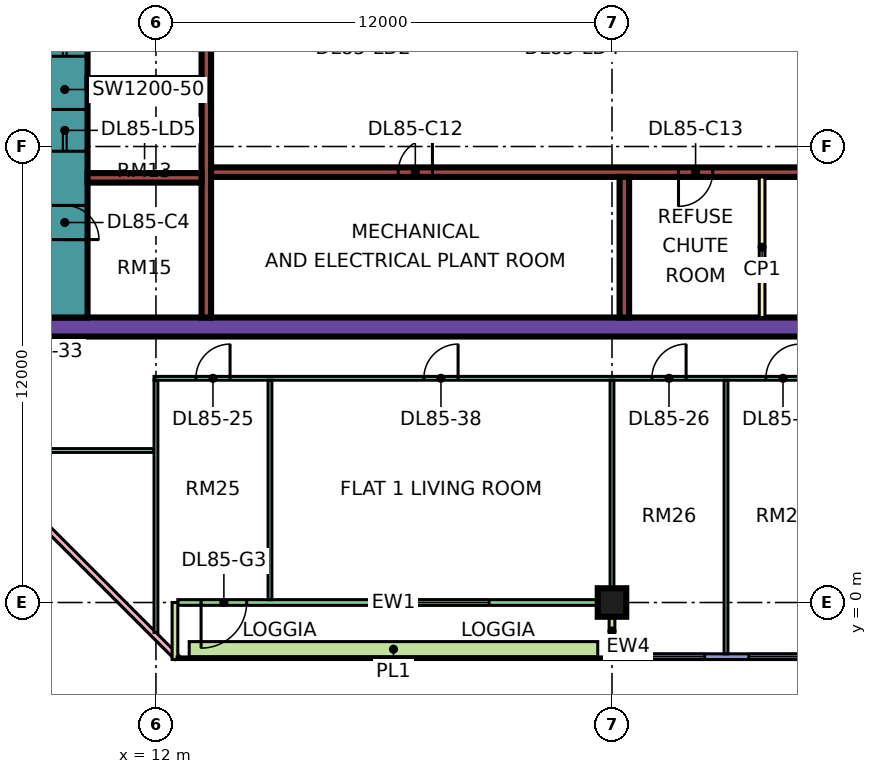
"""IFC4 building model, lengths in metres.
Left out: names, types, materials, properties, quantities, classifications, styles, units other than length and angle.
Written with IfcOpenShell. Run it as: python <this file> out.ifc"""

import sys

from ifc_helpers import new_model, si_unit, direction, frame, frame_2d, origin, origin_2d, place, context, subcontext, project, spatial, rectangle, extrude, element, fill, save


model = new_model("IFC4")
c1 = context("Model", 3, precision=1e-05, world=origin(), true_north=direction((0.0, 1.0)))
c2 = subcontext(c1, "Body", "Model", "MODEL_VIEW")
j1 = project(units=[si_unit("LENGTHUNIT", "METRE"), si_unit("PLANEANGLEUNIT", "RADIAN")], contexts=[c1])
p1 = place(None, origin())
s1 = spatial("IfcSite", under=j1, at=p1, CompositionType="ELEMENT")
p2 = place(p1, origin())
s2 = spatial("IfcBuilding", under=s1, at=p2, CompositionType="ELEMENT")
p3 = place(p2, frame((0.0, 0.0, 365.15)))
s3 = spatial("IfcBuildingStorey", under=s2, at=p3, CompositionType="ELEMENT", Elevation=365.15)
p4 = place(p3, frame((24.0, 0.0, 0.0), z_axis=(0.0, 0.0, 1.0), x_axis=(1.0, 0.0, 0.0)))
e1 = element("IfcColumn", 1, at=p4, inside=s3, PredefinedType="COLUMN", context=c2, shape_type="SweptSolid", body=[
    extrude(rectangle(XDim=0.75, YDim=0.75, at=origin_2d()), origin(), (0.0, 0.0, 1.0), 3.75),
])
p5 = place(p3, frame((9.0, 7.25, 0.0), z_axis=(0.0, 0.0, 1.0), x_axis=(1.0, 0.0, 0.0)))
e2 = element("IfcWall", 2, at=p5, inside=s3, PredefinedType="SHEAR", context=c2, shape_type="SweptSolid", body=[
    extrude(rectangle(XDim=25.0, YDim=0.5, at=frame_2d((12.5, 0.0))), origin(), (0.0, 0.0, 1.0), 3.75),
])
p6 = place(p3, frame((9.6, 7.5, 0.0), z_axis=(0.0, 0.0, 1.0), x_axis=(0.0, 1.0, 0.0)))
e3 = element("IfcWall", 3, at=p6, inside=s3, PredefinedType="SHEAR", context=c2, shape_type="SweptSolid", body=[
    extrude(rectangle(XDim=12.0, YDim=1.2, at=frame_2d((6.0, 0.0))), origin(), (0.0, 0.0, 1.0), 3.75),
])
p7 = place(p6, frame((4.375, 0.0, 0.0)))
e4 = element("IfcOpeningElement", 4, at=p7, cuts=e3, PredefinedType="OPENING", context=c2, shape_type="SweptSolid", body=[
    extrude(rectangle(XDim=1.1, YDim=2.2, at=frame_2d((0.55, 1.1))), frame((0.0, 0.61, 0.0), z_axis=(0.0, -1.0, 0.0), x_axis=(1.0, 0.0, 0.0)), (0.0, 0.0, 1.0), 1.22),
])
p8 = place(p6, frame((6.875, 0.0, 0.0)))
e5 = element("IfcOpeningElement", 5, at=p8, cuts=e3, PredefinedType="OPENING", context=c2, shape_type="SweptSolid", body=[
    extrude(rectangle(XDim=1.1, YDim=2.2, at=frame_2d((0.55, 1.1))), frame((0.0, 0.61, 0.0), z_axis=(0.0, -1.0, 0.0), x_axis=(1.0, 0.0, 0.0)), (0.0, 0.0, 1.0), 1.22),
])
p9 = place(p6, frame((9.85, 0.0, 0.0)))
e6 = element("IfcOpeningElement", 6, at=p9, cuts=e3, PredefinedType="OPENING", context=c2, shape_type="SweptSolid", body=[
    extrude(rectangle(XDim=1.1, YDim=2.2, at=frame_2d((0.55, 1.1))), frame((0.0, 0.61, 0.0), z_axis=(0.0, -1.0, 0.0), x_axis=(1.0, 0.0, 0.0)), (0.0, 0.0, 1.0), 1.22),
])
p10 = place(p6, frame((2.05, 0.0, 0.0)))
e7 = element("IfcOpeningElement", 7, at=p10, cuts=e3, PredefinedType="OPENING", context=c2, shape_type="SweptSolid", body=[
    extrude(rectangle(XDim=0.9, YDim=2.1, at=frame_2d((0.45, 1.05))), frame((0.0, 0.61, 0.0), z_axis=(0.0, -1.0, 0.0), x_axis=(1.0, 0.0, 0.0)), (0.0, 0.0, 1.0), 1.22),
])
p11 = place(p3, frame((13.325, 7.5, 0.0), z_axis=(0.0, 0.0, 1.0), x_axis=(0.0, 1.0, 0.0)))
e8 = element("IfcWall", 8, at=p11, inside=s3, PredefinedType="SHEAR", context=c2, shape_type="SweptSolid", body=[
    extrude(rectangle(XDim=12.0, YDim=0.25, at=frame_2d((6.0, 0.0))), origin(), (0.0, 0.0, 1.0), 3.75),
])
p12 = place(p3, frame((13.45, 11.325, 0.0), z_axis=(0.0, 0.0, 1.0), x_axis=(1.0, 0.0, 0.0)))
e9 = element("IfcWall", 9, at=p12, inside=s3, PredefinedType="SHEAR", context=c2, shape_type="SweptSolid", body=[
    extrude(rectangle(XDim=20.05, YDim=0.25, at=frame_2d((10.025, 0.0))), origin(), (0.0, 0.0, 1.0), 3.75),
])
p13 = place(p12, frame((4.925, 0.0, 0.0)))
e10 = element("IfcOpeningElement", 10, at=p13, cuts=e9, PredefinedType="OPENING", context=c2, shape_type="SweptSolid", body=[
    extrude(rectangle(XDim=0.9, YDim=2.1, at=frame_2d((0.45, 1.05))), frame((0.0, 0.135, 0.0), z_axis=(0.0, -1.0, 0.0), x_axis=(1.0, 0.0, 0.0)), (0.0, 0.0, 1.0), 0.27),
])
p14 = place(p12, frame((12.3, 0.0, 0.0)))
e11 = element("IfcOpeningElement", 11, at=p14, cuts=e9, PredefinedType="OPENING", context=c2, shape_type="SweptSolid", body=[
    extrude(rectangle(XDim=0.9, YDim=2.1, at=frame_2d((0.45, 1.05))), frame((0.0, 0.135, 0.0), z_axis=(0.0, -1.0, 0.0), x_axis=(1.0, 0.0, 0.0)), (0.0, 0.0, 1.0), 0.27),
])
p15 = place(p12, frame((16.825, 0.0, 0.0)))
e12 = element("IfcOpeningElement", 12, at=p15, cuts=e9, PredefinedType="OPENING", context=c2, shape_type="SweptSolid", body=[
    extrude(rectangle(XDim=0.9, YDim=2.1, at=frame_2d((0.45, 1.05))), frame((0.0, 0.135, 0.0), z_axis=(0.0, -1.0, 0.0), x_axis=(1.0, 0.0, 0.0)), (0.0, 0.0, 1.0), 0.27),
])
for number, where, z_axis, x_axis in (
    (13, (10.2, 11.175, 0.0), (0.0, 0.0, 1.0), (1.0, 0.0, 0.0)),
    (14, (10.2, 13.675, 0.0), (0.0, 0.0, 1.0), (1.0, 0.0, 0.0)),
):
    element("IfcWall", number, at=place(p3, frame(where, z_axis=z_axis, x_axis=x_axis)), inside=s3, PredefinedType="SHEAR", context=c2, shape_type="SweptSolid", body=[
        extrude(rectangle(XDim=3.0, YDim=0.25, at=frame_2d((1.5, 0.0))), origin(), (0.0, 0.0, 1.0), 3.75),
    ])
p16 = place(p3, frame((24.325, 7.5, 0.0), z_axis=(0.0, 0.0, 1.0), x_axis=(0.0, 1.0, 0.0)))
e15 = element("IfcWall", 15, at=p16, inside=s3, PredefinedType="SHEAR", context=c2, shape_type="SweptSolid", body=[
    extrude(rectangle(XDim=3.7, YDim=0.25, at=frame_2d((1.85, 0.0))), origin(), (0.0, 0.0, 1.0), 3.75),
])
p17 = place(p3, frame((-1.447, 12.553, 0.0), z_axis=(0.0, 0.0, 1.0), x_axis=(0.707106781187, -0.707106781187, 0.0)))
e16 = element("IfcWall", 16, at=p17, inside=s3, PredefinedType="SOLIDWALL", context=c2, shape_type="SweptSolid", body=[
    extrude(rectangle(XDim=19.799, YDim=0.15, at=frame_2d((9.899, 0.0))), origin(), (0.0, 0.0, 1.0), 3.35),
])
p18 = place(p17, frame((2.212, 0.0, 0.45)))
e17 = element("IfcOpeningElement", 17, at=p18, cuts=e16, PredefinedType="OPENING", context=c2, shape_type="SweptSolid", body=[
    extrude(rectangle(XDim=3.0, YDim=2.4, at=frame_2d((1.5, 1.2))), frame((0.0, 0.085, 0.0), z_axis=(0.0, -1.0, 0.0), x_axis=(1.0, 0.0, 0.0)), (0.0, 0.0, 1.0), 0.17),
])
p19 = place(p17, frame((10.216, 0.0, 0.45)))
e18 = element("IfcOpeningElement", 18, at=p19, cuts=e16, PredefinedType="OPENING", context=c2, shape_type="SweptSolid", body=[
    extrude(rectangle(XDim=3.0, YDim=2.4, at=frame_2d((1.5, 1.2))), frame((0.0, 0.085, 0.0), z_axis=(0.0, -1.0, 0.0), x_axis=(1.0, 0.0, 0.0)), (0.0, 0.0, 1.0), 0.17),
])
p20 = place(p3, frame((12.575, 0.0, 0.0), z_axis=(0.0, 0.0, 1.0), x_axis=(1.0, 0.0, 0.0)))
e19 = element("IfcWall", 19, at=p20, inside=s3, PredefinedType="SOLIDWALL", context=c2, shape_type="SweptSolid", body=[
    extrude(rectangle(XDim=11.35, YDim=0.15, at=frame_2d((5.675, 0.0))), origin(), (0.0, 0.0, 1.0), 3.35),
])
p21 = place(p20, frame((0.613, 0.0, 0.0)))
e20 = element("IfcOpeningElement", 20, at=p21, cuts=e19, PredefinedType="OPENING", context=c2, shape_type="SweptSolid", body=[
    extrude(rectangle(XDim=1.2, YDim=2.4, at=frame_2d((0.6, 1.2))), frame((0.0, 0.085, 0.0), z_axis=(0.0, -1.0, 0.0), x_axis=(1.0, 0.0, 0.0)), (0.0, 0.0, 1.0), 0.17),
])
p22 = place(p20, frame((5.188, 0.0, 0.45)))
e21 = element("IfcOpeningElement", 21, at=p22, cuts=e19, PredefinedType="OPENING", context=c2, shape_type="SweptSolid", body=[
    extrude(rectangle(XDim=3.0, YDim=2.4, at=frame_2d((1.5, 1.2))), frame((0.0, 0.085, 0.0), z_axis=(0.0, -1.0, 0.0), x_axis=(1.0, 0.0, 0.0)), (0.0, 0.0, 1.0), 0.17),
])
for number, where, z_axis, x_axis in (
    (22, (12.5, -1.5, 0.0), (0.0, 0.0, 1.0), (0.0, 1.0, 0.0)),
    (23, (24.0, -1.5, 0.0), (0.0, 0.0, 1.0), (0.0, 1.0, 0.0)),
):
    element("IfcWall", number, at=place(p3, frame(where, z_axis=z_axis, x_axis=x_axis)), inside=s3, PredefinedType="SOLIDWALL", context=c2, shape_type="SweptSolid", body=[
        extrude(rectangle(XDim=1.5, YDim=0.15, at=frame_2d((0.75, 0.0))), origin(), (0.0, 0.0, 1.0), 3.35),
    ])
p23 = place(p3, frame((24.075, -1.425, 0.0), z_axis=(0.0, 0.0, 1.0), x_axis=(1.0, 0.0, 0.0)))
e24 = element("IfcWall", 24, at=p23, inside=s3, PredefinedType="SOLIDWALL", context=c2, shape_type="SweptSolid", body=[
    extrude(rectangle(XDim=11.85, YDim=0.15, at=frame_2d((5.925, 0.0))), origin(), (0.0, 0.0, 1.0), 3.35),
])
p24 = place(p23, frame((0.562, 0.0, 0.45)))
e25 = element("IfcOpeningElement", 25, at=p24, cuts=e24, PredefinedType="OPENING", context=c2, shape_type="SweptSolid", body=[
    extrude(rectangle(XDim=1.8, YDim=2.4, at=frame_2d((0.9, 1.2))), frame((0.0, 0.085, 0.0), z_axis=(0.0, -1.0, 0.0), x_axis=(1.0, 0.0, 0.0)), (0.0, 0.0, 1.0), 0.17),
])
p25 = place(p23, frame((3.525, 0.0, 0.45)))
e26 = element("IfcOpeningElement", 26, at=p25, cuts=e24, PredefinedType="OPENING", context=c2, shape_type="SweptSolid", body=[
    extrude(rectangle(XDim=1.8, YDim=2.4, at=frame_2d((0.9, 1.2))), frame((0.0, 0.085, 0.0), z_axis=(0.0, -1.0, 0.0), x_axis=(1.0, 0.0, 0.0)), (0.0, 0.0, 1.0), 0.17),
])
p26 = place(p23, frame((6.525, 0.0, 0.45)))
e27 = element("IfcOpeningElement", 27, at=p26, cuts=e24, PredefinedType="OPENING", context=c2, shape_type="SweptSolid", body=[
    extrude(rectangle(XDim=1.8, YDim=2.4, at=frame_2d((0.9, 1.2))), frame((0.0, 0.085, 0.0), z_axis=(0.0, -1.0, 0.0), x_axis=(1.0, 0.0, 0.0)), (0.0, 0.0, 1.0), 0.17),
])
p27 = place(p23, frame((9.488, 0.0, 0.45)))
e28 = element("IfcOpeningElement", 28, at=p27, cuts=e24, PredefinedType="OPENING", context=c2, shape_type="SweptSolid", body=[
    extrude(rectangle(XDim=1.8, YDim=2.4, at=frame_2d((0.9, 1.2))), frame((0.0, 0.085, 0.0), z_axis=(0.0, -1.0, 0.0), x_axis=(1.0, 0.0, 0.0)), (0.0, 0.0, 1.0), 0.17),
])
p28 = place(p3, frame((12.875, -1.229, 0.0), z_axis=(0.0, 0.0, 1.0), x_axis=(1.0, 0.0, 0.0)))
e29 = element("IfcWall", 29, at=p28, inside=s3, PredefinedType="SOLIDWALL", context=c2, shape_type="SweptSolid", body=[
    extrude(rectangle(XDim=10.75, YDim=0.4, at=frame_2d((5.375, 0.0))), origin(), (0.0, 0.0, 1.0), 0.7),
])
p29 = place(p3, frame((27.95, 7.5, 0.0), z_axis=(0.0, 0.0, 1.0), x_axis=(0.0, 1.0, 0.0)))
e30 = element("IfcWall", 30, at=p29, inside=s3, PredefinedType="PARTITIONING", context=c2, shape_type="SweptSolid", body=[
    extrude(rectangle(XDim=3.7, YDim=0.15, at=frame_2d((1.85, 0.0))), origin(), (0.0, 0.0, 1.0), 3.35),
])
p30 = place(p3, frame((9.05, 4.0, 0.0), z_axis=(0.0, 0.0, 1.0), x_axis=(1.0, 0.0, 0.0)))
e31 = element("IfcWall", 31, at=p30, inside=s3, PredefinedType="PARTITIONING", context=c2, shape_type="SweptSolid", body=[
    extrude(rectangle(XDim=2.9, YDim=0.1, at=frame_2d((1.45, 0.0))), origin(), (0.0, 0.0, 1.0), 3.35),
])
p31 = place(p3, frame((11.95, 5.9, 0.0), z_axis=(0.0, 0.0, 1.0), x_axis=(1.0, 0.0, 0.0)))
e32 = element("IfcWall", 32, at=p31, inside=s3, PredefinedType="PARTITIONING", context=c2, shape_type="SweptSolid", body=[
    extrude(rectangle(XDim=21.1, YDim=0.1, at=frame_2d((10.55, 0.0))), origin(), (0.0, 0.0, 1.0), 3.35),
])
p32 = place(p31, frame((1.1, 0.0, 0.0)))
e33 = element("IfcOpeningElement", 33, at=p32, cuts=e32, PredefinedType="OPENING", context=c2, shape_type="SweptSolid", body=[
    extrude(rectangle(XDim=0.9, YDim=2.1, at=frame_2d((0.45, 1.05))), frame((0.0, 0.06, 0.0), z_axis=(0.0, -1.0, 0.0), x_axis=(1.0, 0.0, 0.0)), (0.0, 0.0, 1.0), 0.12),
])
p33 = place(p31, frame((13.1, 0.0, 0.0)))
e34 = element("IfcOpeningElement", 34, at=p33, cuts=e32, PredefinedType="OPENING", context=c2, shape_type="SweptSolid", body=[
    extrude(rectangle(XDim=0.9, YDim=2.1, at=frame_2d((0.45, 1.05))), frame((0.0, 0.06, 0.0), z_axis=(0.0, -1.0, 0.0), x_axis=(1.0, 0.0, 0.0)), (0.0, 0.0, 1.0), 0.12),
])
p34 = place(p31, frame((16.1, 0.0, 0.0)))
e35 = element("IfcOpeningElement", 35, at=p34, cuts=e32, PredefinedType="OPENING", context=c2, shape_type="SweptSolid", body=[
    extrude(rectangle(XDim=0.9, YDim=2.1, at=frame_2d((0.45, 1.05))), frame((0.0, 0.06, 0.0), z_axis=(0.0, -1.0, 0.0), x_axis=(1.0, 0.0, 0.0)), (0.0, 0.0, 1.0), 0.12),
])
p35 = place(p31, frame((7.1, 0.0, 0.0)))
e36 = element("IfcOpeningElement", 36, at=p35, cuts=e32, PredefinedType="OPENING", context=c2, shape_type="SweptSolid", body=[
    extrude(rectangle(XDim=0.9, YDim=2.1, at=frame_2d((0.45, 1.05))), frame((0.0, 0.06, 0.0), z_axis=(0.0, -1.0, 0.0), x_axis=(1.0, 0.0, 0.0)), (0.0, 0.0, 1.0), 0.12),
])
p36 = place(p3, frame((12.0, -0.788, 0.0), z_axis=(0.0, 0.0, 1.0), x_axis=(0.0, 1.0, 0.0)))
e37 = element("IfcWall", 37, at=p36, inside=s3, PredefinedType="PARTITIONING", context=c2, shape_type="SweptSolid", body=[
    extrude(rectangle(XDim=6.638, YDim=0.1, at=frame_2d((3.319, 0.0))), origin(), (0.0, 0.0, 1.0), 3.35),
])
p37 = place(p3, frame((15.0, 0.074, 0.0), z_axis=(0.0, 0.0, 1.0), x_axis=(0.0, 1.0, 0.0)))
e38 = element("IfcWall", 38, at=p37, inside=s3, PredefinedType="PARTITIONING", context=c2, shape_type="SweptSolid", body=[
    extrude(rectangle(XDim=5.776, YDim=0.1, at=frame_2d((2.888, 0.0))), origin(), (0.0, 0.0, 1.0), 3.35),
])
p38 = place(p3, frame((24.0, 0.0, 0.0), z_axis=(0.0, 0.0, 1.0), x_axis=(0.0, 1.0, 0.0)))
e39 = element("IfcWall", 39, at=p38, inside=s3, PredefinedType="PARTITIONING", context=c2, shape_type="SweptSolid", body=[
    extrude(rectangle(XDim=5.85, YDim=0.1, at=frame_2d((2.925, 0.0))), origin(), (0.0, 0.0, 1.0), 3.35),
])
p39 = place(p3, frame((27.0, -1.351, 0.0), z_axis=(0.0, 0.0, 1.0), x_axis=(0.0, 1.0, 0.0)))
e40 = element("IfcWall", 40, at=p39, inside=s3, PredefinedType="PARTITIONING", context=c2, shape_type="SweptSolid", body=[
    extrude(rectangle(XDim=7.201, YDim=0.1, at=frame_2d((3.601, 0.0))), origin(), (0.0, 0.0, 1.0), 3.35),
])
p40 = place(p21, frame((1.2, 0.0, 0.0), z_axis=(0.0, 0.0, 1.0), x_axis=(-1.0, 0.0, 0.0)))
e41 = element("IfcDoor", 41, at=p40, inside=s3, OperationType="DOUBLE_DOOR_SINGLE_SWING", PredefinedType="DOOR", context=c2, shape_type="SweptSolid", body=[
    extrude(rectangle(XDim=1.2, YDim=2.4, at=frame_2d((0.6, 1.2))), frame((0.0, 0.025, 0.0), z_axis=(0.0, -1.0, 0.0), x_axis=(1.0, 0.0, 0.0)), (0.0, 0.0, 1.0), 0.05),
])
fill(e20, e41)
p41 = place(p22, origin())
e42 = element("IfcWindow", 42, at=p41, inside=s3, PartitioningType="SINGLE_PANEL", PredefinedType="WINDOW", context=c2, shape_type="SweptSolid", body=[
    extrude(rectangle(XDim=3.0, YDim=2.4, at=frame_2d((1.5, 1.2))), frame((0.0, 0.03, 0.0), z_axis=(0.0, -1.0, 0.0), x_axis=(1.0, 0.0, 0.0)), (0.0, 0.0, 1.0), 0.06),
])
fill(e21, e42)
p42 = place(p24, origin())
e43 = element("IfcWindow", 43, at=p42, inside=s3, PartitioningType="SINGLE_PANEL", PredefinedType="WINDOW", context=c2, shape_type="SweptSolid", body=[
    extrude(rectangle(XDim=1.8, YDim=2.4, at=frame_2d((0.9, 1.2))), frame((0.0, 0.03, 0.0), z_axis=(0.0, -1.0, 0.0), x_axis=(1.0, 0.0, 0.0)), (0.0, 0.0, 1.0), 0.06),
])
fill(e25, e43)
p43 = place(p25, origin())
e44 = element("IfcWindow", 44, at=p43, inside=s3, PartitioningType="SINGLE_PANEL", PredefinedType="WINDOW", context=c2, shape_type="SweptSolid", body=[
    extrude(rectangle(XDim=1.8, YDim=2.4, at=frame_2d((0.9, 1.2))), frame((0.0, 0.03, 0.0), z_axis=(0.0, -1.0, 0.0), x_axis=(1.0, 0.0, 0.0)), (0.0, 0.0, 1.0), 0.06),
])
fill(e26, e44)
p44 = place(p7, origin())
e45 = element("IfcDoor", 45, at=p44, inside=s3, OperationType="DOUBLE_DOOR_SLIDING", PredefinedType="DOOR", context=c2, shape_type="SweptSolid", body=[
    extrude(rectangle(XDim=1.1, YDim=2.2, at=frame_2d((0.55, 1.1))), frame((0.0, 0.025, 0.0), z_axis=(0.0, -1.0, 0.0), x_axis=(1.0, 0.0, 0.0)), (0.0, 0.0, 1.0), 0.05),
])
fill(e4, e45)
p45 = place(p8, origin())
e46 = element("IfcDoor", 46, at=p45, inside=s3, OperationType="DOUBLE_DOOR_SLIDING", PredefinedType="DOOR", context=c2, shape_type="SweptSolid", body=[
    extrude(rectangle(XDim=1.1, YDim=2.2, at=frame_2d((0.55, 1.1))), frame((0.0, 0.025, 0.0), z_axis=(0.0, -1.0, 0.0), x_axis=(1.0, 0.0, 0.0)), (0.0, 0.0, 1.0), 0.05),
])
fill(e5, e46)
p46 = place(p10, frame((0.9, 0.0, 0.0), z_axis=(0.0, 0.0, 1.0), x_axis=(-1.0, 0.0, 0.0)))
e47 = element("IfcDoor", 47, at=p46, inside=s3, OperationType="SINGLE_SWING_LEFT", PredefinedType="DOOR", context=c2, shape_type="SweptSolid", body=[
    extrude(rectangle(XDim=0.9, YDim=2.1, at=frame_2d((0.45, 1.05))), frame((0.0, 0.025, 0.0), z_axis=(0.0, -1.0, 0.0), x_axis=(1.0, 0.0, 0.0)), (0.0, 0.0, 1.0), 0.05),
])
fill(e7, e47)
p47 = place(p13, frame((0.9, 0.0, 0.0), z_axis=(0.0, 0.0, 1.0), x_axis=(-1.0, 0.0, 0.0)))
e48 = element("IfcDoor", 48, at=p47, inside=s3, OperationType="SINGLE_SWING_RIGHT", PredefinedType="DOOR", context=c2, shape_type="SweptSolid", body=[
    extrude(rectangle(XDim=0.9, YDim=2.1, at=frame_2d((0.45, 1.05))), frame((0.0, 0.025, 0.0), z_axis=(0.0, -1.0, 0.0), x_axis=(1.0, 0.0, 0.0)), (0.0, 0.0, 1.0), 0.05),
])
fill(e10, e48)
p48 = place(p14, frame((0.9, 0.0, 0.0), z_axis=(0.0, 0.0, 1.0), x_axis=(-1.0, 0.0, 0.0)))
e49 = element("IfcDoor", 49, at=p48, inside=s3, OperationType="SINGLE_SWING_LEFT", PredefinedType="DOOR", context=c2, shape_type="SweptSolid", body=[
    extrude(rectangle(XDim=0.9, YDim=2.1, at=frame_2d((0.45, 1.05))), frame((0.0, 0.025, 0.0), z_axis=(0.0, -1.0, 0.0), x_axis=(1.0, 0.0, 0.0)), (0.0, 0.0, 1.0), 0.05),
])
fill(e11, e49)
p49 = place(p32, frame((0.9, 0.0, 0.0), z_axis=(0.0, 0.0, 1.0), x_axis=(-1.0, 0.0, 0.0)))
e50 = element("IfcDoor", 50, at=p49, inside=s3, OperationType="SINGLE_SWING_RIGHT", PredefinedType="DOOR", context=c2, shape_type="SweptSolid", body=[
    extrude(rectangle(XDim=0.9, YDim=2.1, at=frame_2d((0.45, 1.05))), frame((0.0, 0.025, 0.0), z_axis=(0.0, -1.0, 0.0), x_axis=(1.0, 0.0, 0.0)), (0.0, 0.0, 1.0), 0.05),
])
fill(e33, e50)
p50 = place(p33, frame((0.9, 0.0, 0.0), z_axis=(0.0, 0.0, 1.0), x_axis=(-1.0, 0.0, 0.0)))
e51 = element("IfcDoor", 51, at=p50, inside=s3, OperationType="SINGLE_SWING_RIGHT", PredefinedType="DOOR", context=c2, shape_type="SweptSolid", body=[
    extrude(rectangle(XDim=0.9, YDim=2.1, at=frame_2d((0.45, 1.05))), frame((0.0, 0.025, 0.0), z_axis=(0.0, -1.0, 0.0), x_axis=(1.0, 0.0, 0.0)), (0.0, 0.0, 1.0), 0.05),
])
fill(e34, e51)
p51 = place(p34, frame((0.9, 0.0, 0.0), z_axis=(0.0, 0.0, 1.0), x_axis=(-1.0, 0.0, 0.0)))
e52 = element("IfcDoor", 52, at=p51, inside=s3, OperationType="SINGLE_SWING_RIGHT", PredefinedType="DOOR", context=c2, shape_type="SweptSolid", body=[
    extrude(rectangle(XDim=0.9, YDim=2.1, at=frame_2d((0.45, 1.05))), frame((0.0, 0.025, 0.0), z_axis=(0.0, -1.0, 0.0), x_axis=(1.0, 0.0, 0.0)), (0.0, 0.0, 1.0), 0.05),
])
fill(e35, e52)
p52 = place(p35, frame((0.9, 0.0, 0.0), z_axis=(0.0, 0.0, 1.0), x_axis=(-1.0, 0.0, 0.0)))
e53 = element("IfcDoor", 53, at=p52, inside=s3, OperationType="SINGLE_SWING_RIGHT", PredefinedType="DOOR", context=c2, shape_type="SweptSolid", body=[
    extrude(rectangle(XDim=0.9, YDim=2.1, at=frame_2d((0.45, 1.05))), frame((0.0, 0.025, 0.0), z_axis=(0.0, -1.0, 0.0), x_axis=(1.0, 0.0, 0.0)), (0.0, 0.0, 1.0), 0.05),
])
fill(e36, e53)
save(model, sys.argv[1])
